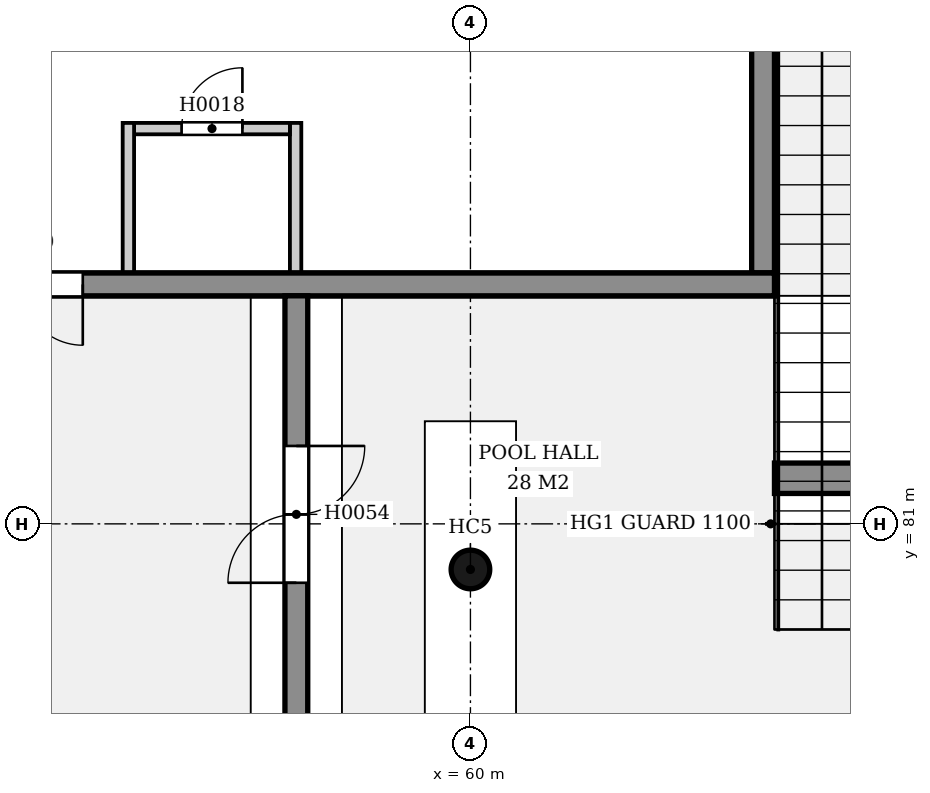
"""IFC4 building model, lengths in metres.
Left out: names, types, materials, properties, quantities, classifications, styles, units other than length and angle.
Written with IfcOpenShell. Run it as: python <this file> out.ifc"""

import sys

from ifc_helpers import new_model, si_unit, direction, frame, frame_2d, origin, origin_2d, place, context, subcontext, project, spatial, rectangle, hollow_circle, extrude, element, fill, save


model = new_model("IFC4")
c1 = context("Model", 3, precision=1e-05, world=origin(), true_north=direction((0.0, 1.0)))
c2 = subcontext(c1, "Body", "Model", "MODEL_VIEW")
j1 = project(units=[si_unit("LENGTHUNIT", "METRE"), si_unit("PLANEANGLEUNIT", "RADIAN")], contexts=[c1])
p1 = place(None, origin())
s1 = spatial("IfcSite", under=j1, at=p1, CompositionType="ELEMENT")
p2 = place(p1, origin())
s2 = spatial("IfcBuilding", under=s1, at=p2, CompositionType="ELEMENT")
p3 = place(p2, origin())
s3 = spatial("IfcBuildingStorey", under=s2, at=p3, CompositionType="ELEMENT", Elevation=0.0)
p4 = place(p3, frame((57.71, 38.0, 0.0), z_axis=(0.0, 0.0, 1.0), x_axis=(0.0, 1.0, 0.0)))
e1 = element("IfcWall", 1, at=p4, inside=s3, PredefinedType="SOLIDWALL", context=c2, shape_type="SweptSolid", body=[
    extrude(rectangle(XDim=46.0, YDim=0.3, at=frame_2d((23.0, 0.0))), origin(), (0.0, 0.0, 1.0), 5.0),
])
p5 = place(p4, frame((1.975, 0.0, 0.0)))
e2 = element("IfcOpeningElement", 2, at=p5, cuts=e1, PredefinedType="OPENING", context=c2, shape_type="SweptSolid", body=[
    extrude(rectangle(XDim=1.8, YDim=2.1, at=frame_2d((0.9, 1.05))), frame((0.0, 0.16, 0.0), z_axis=(0.0, -1.0, 0.0), x_axis=(1.0, 0.0, 0.0)), (0.0, 0.0, 1.0), 0.32),
])
p6 = place(p4, frame((7.725, 0.0, 0.0)))
e3 = element("IfcOpeningElement", 3, at=p6, cuts=e1, PredefinedType="OPENING", context=c2, shape_type="SweptSolid", body=[
    extrude(rectangle(XDim=1.8, YDim=2.1, at=frame_2d((0.9, 1.05))), frame((0.0, 0.16, 0.0), z_axis=(0.0, -1.0, 0.0), x_axis=(1.0, 0.0, 0.0)), (0.0, 0.0, 1.0), 0.32),
])
p7 = place(p4, frame((13.475, 0.0, 0.0)))
e4 = element("IfcOpeningElement", 4, at=p7, cuts=e1, PredefinedType="OPENING", context=c2, shape_type="SweptSolid", body=[
    extrude(rectangle(XDim=1.8, YDim=2.1, at=frame_2d((0.9, 1.05))), frame((0.0, 0.16, 0.0), z_axis=(0.0, -1.0, 0.0), x_axis=(1.0, 0.0, 0.0)), (0.0, 0.0, 1.0), 0.32),
])
p8 = place(p4, frame((19.225, 0.0, 0.0)))
e5 = element("IfcOpeningElement", 5, at=p8, cuts=e1, PredefinedType="OPENING", context=c2, shape_type="SweptSolid", body=[
    extrude(rectangle(XDim=1.8, YDim=2.1, at=frame_2d((0.9, 1.05))), frame((0.0, 0.16, 0.0), z_axis=(0.0, -1.0, 0.0), x_axis=(1.0, 0.0, 0.0)), (0.0, 0.0, 1.0), 0.32),
])
p9 = place(p4, frame((24.975, 0.0, 0.0)))
e6 = element("IfcOpeningElement", 6, at=p9, cuts=e1, PredefinedType="OPENING", context=c2, shape_type="SweptSolid", body=[
    extrude(rectangle(XDim=1.8, YDim=2.1, at=frame_2d((0.9, 1.05))), frame((0.0, 0.16, 0.0), z_axis=(0.0, -1.0, 0.0), x_axis=(1.0, 0.0, 0.0)), (0.0, 0.0, 1.0), 0.32),
])
p10 = place(p4, frame((30.725, 0.0, 0.0)))
e7 = element("IfcOpeningElement", 7, at=p10, cuts=e1, PredefinedType="OPENING", context=c2, shape_type="SweptSolid", body=[
    extrude(rectangle(XDim=1.8, YDim=2.1, at=frame_2d((0.9, 1.05))), frame((0.0, 0.16, 0.0), z_axis=(0.0, -1.0, 0.0), x_axis=(1.0, 0.0, 0.0)), (0.0, 0.0, 1.0), 0.32),
])
p11 = place(p4, frame((36.475, 0.0, 0.0)))
e8 = element("IfcOpeningElement", 8, at=p11, cuts=e1, PredefinedType="OPENING", context=c2, shape_type="SweptSolid", body=[
    extrude(rectangle(XDim=1.8, YDim=2.1, at=frame_2d((0.9, 1.05))), frame((0.0, 0.16, 0.0), z_axis=(0.0, -1.0, 0.0), x_axis=(1.0, 0.0, 0.0)), (0.0, 0.0, 1.0), 0.32),
])
p12 = place(p4, frame((42.225, 0.0, 0.0)))
e9 = element("IfcOpeningElement", 9, at=p12, cuts=e1, PredefinedType="OPENING", context=c2, shape_type="SweptSolid", body=[
    extrude(rectangle(XDim=1.8, YDim=2.1, at=frame_2d((0.9, 1.05))), frame((0.0, 0.16, 0.0), z_axis=(0.0, -1.0, 0.0), x_axis=(1.0, 0.0, 0.0)), (0.0, 0.0, 1.0), 0.32),
])
p13 = place(p3, frame((64.0, 81.6, -0.8), z_axis=(0.0, 0.0, 1.0), x_axis=(1.0, 0.0, 0.0)))
e10 = element("IfcWall", 10, at=p13, inside=s3, PredefinedType="SOLIDWALL", context=c2, shape_type="SweptSolid", body=[
    extrude(rectangle(XDim=76.0, YDim=0.4, at=frame_2d((38.0, 0.0))), origin(), (0.0, 0.0, 1.0), 1.66),
])
p14 = place(p3, frame((63.85, 95.55, -1.6), z_axis=(0.0, 0.0, 1.0), x_axis=(0.0, -1.0, 0.0)))
e11 = element("IfcWall", 11, at=p14, inside=s3, PredefinedType="SOLIDWALL", context=c2, shape_type="SweptSolid", body=[
    extrude(rectangle(XDim=11.25, YDim=0.3, at=frame_2d((5.625, 0.0))), origin(), (0.0, 0.0, 1.0), 1.35),
])
p15 = place(p3, frame((63.85, 95.55, 0.0), z_axis=(0.0, 0.0, 1.0), x_axis=(0.0, -1.0, 0.0)))
e12 = element("IfcWall", 12, at=p15, inside=s3, PredefinedType="SOLIDWALL", context=c2, shape_type="SweptSolid", body=[
    extrude(rectangle(XDim=11.25, YDim=0.3, at=frame_2d((5.625, 0.0))), origin(), (0.0, 0.0, 1.0), 5.0),
])
p16 = place(p15, frame((3.37, 0.0, 0.0)))
e13 = element("IfcOpeningElement", 13, at=p16, cuts=e12, PredefinedType="OPENING", context=c2, shape_type="SweptSolid", body=[
    extrude(rectangle(XDim=1.6, YDim=2.1, at=frame_2d((0.8, 1.05))), frame((0.0, 0.16, 0.0), z_axis=(0.0, -1.0, 0.0), x_axis=(1.0, 0.0, 0.0)), (0.0, 0.0, 1.0), 0.32),
])
p17 = place(p3, frame((52.45, 84.15, -1.6), z_axis=(0.0, 0.0, 1.0), x_axis=(1.0, 0.0, 0.0)))
e14 = element("IfcWall", 14, at=p17, inside=s3, PredefinedType="SOLIDWALL", context=c2, shape_type="SweptSolid", body=[
    extrude(rectangle(XDim=11.55, YDim=0.3, at=frame_2d((5.775, 0.0))), origin(), (0.0, 0.0, 1.0), 1.35),
])
p18 = place(p3, frame((52.45, 84.15, 0.0), z_axis=(0.0, 0.0, 1.0), x_axis=(1.0, 0.0, 0.0)))
e15 = element("IfcWall", 15, at=p18, inside=s3, PredefinedType="SOLIDWALL", context=c2, shape_type="SweptSolid", body=[
    extrude(rectangle(XDim=11.55, YDim=0.3, at=frame_2d((5.775, 0.0))), origin(), (0.0, 0.0, 1.0), 5.0),
])
p19 = place(p18, frame((0.85, 0.0, 0.0)))
e16 = element("IfcOpeningElement", 16, at=p19, cuts=e15, PredefinedType="OPENING", context=c2, shape_type="SweptSolid", body=[
    extrude(rectangle(XDim=1.6, YDim=2.1, at=frame_2d((0.8, 1.05))), frame((0.0, 0.16, 0.0), z_axis=(0.0, -1.0, 0.0), x_axis=(1.0, 0.0, 0.0)), (0.0, 0.0, 1.0), 0.32),
])
p20 = place(p3, frame((60.0, 80.4, 0.0), z_axis=(0.0, 0.0, 1.0), x_axis=(1.0, 0.0, 0.0)))
e17 = element("IfcColumn", 17, at=p20, inside=s3, PredefinedType="COLUMN", context=c2, shape_type="SweptSolid", body=[
    extrude(hollow_circle(Radius=0.254, WallThickness=0.016, at=origin_2d()), origin(), (0.0, 0.0, 1.0), 5.0),
])
p21 = place(p3, frame((55.575, 86.2, 0.0), z_axis=(0.0, 0.0, 1.0), x_axis=(1.0, 0.0, 0.0)))
e18 = element("IfcWall", 18, at=p21, inside=s3, PredefinedType="PARTITIONING", context=c2, shape_type="SweptSolid", body=[
    extrude(rectangle(XDim=2.05, YDim=0.15, at=frame_2d((1.025, 0.0))), origin(), (0.0, 0.0, 1.0), 4.75),
])
p22 = place(p21, frame((0.625, 0.0, 0.0)))
e19 = element("IfcOpeningElement", 19, at=p22, cuts=e18, PredefinedType="OPENING", context=c2, shape_type="SweptSolid", body=[
    extrude(rectangle(XDim=0.8, YDim=2.1, at=frame_2d((0.4, 1.05))), frame((0.0, 0.085, 0.0), z_axis=(0.0, -1.0, 0.0), x_axis=(1.0, 0.0, 0.0)), (0.0, 0.0, 1.0), 0.17),
])
for number, where, z_axis, x_axis in (
    (20, (55.5, 86.275, 0.0), (0.0, 0.0, 1.0), (0.0, -1.0, 0.0)),
    (21, (57.7, 86.275, 0.0), (0.0, 0.0, 1.0), (0.0, -1.0, 0.0)),
):
    element("IfcWall", number, at=place(p3, frame(where, z_axis=z_axis, x_axis=x_axis)), inside=s3, PredefinedType="PARTITIONING", context=c2, shape_type="SweptSolid", body=[
        extrude(rectangle(XDim=1.975, YDim=0.15, at=frame_2d((0.987, 0.0))), origin(), (0.0, 0.0, 1.0), 4.75),
    ])
p23 = place(p22, origin())
e22 = element("IfcDoor", 22, at=p23, inside=s3, OperationType="SINGLE_SWING_RIGHT", PredefinedType="DOOR", context=c2, shape_type="SweptSolid", body=[
    extrude(rectangle(XDim=0.8, YDim=2.1, at=frame_2d((0.4, 1.05))), frame((0.0, 0.025, 0.0), z_axis=(0.0, -1.0, 0.0), x_axis=(1.0, 0.0, 0.0)), (0.0, 0.0, 1.0), 0.05),
])
fill(e19, e22)
p24 = place(p19, origin())
e23 = element("IfcDoor", 23, at=p24, inside=s3, OperationType="DOUBLE_DOOR_SINGLE_SWING", PredefinedType="DOOR", context=c2, shape_type="SweptSolid", body=[
    extrude(rectangle(XDim=1.6, YDim=2.1, at=frame_2d((0.8, 1.05))), frame((0.0, 0.025, 0.0), z_axis=(0.0, -1.0, 0.0), x_axis=(1.0, 0.0, 0.0)), (0.0, 0.0, 1.0), 0.05),
])
fill(e16, e23)
p25 = place(p12, origin())
e24 = element("IfcDoor", 24, at=p25, inside=s3, OperationType="DOUBLE_DOOR_SINGLE_SWING", PredefinedType="DOOR", context=c2, shape_type="SweptSolid", body=[
    extrude(rectangle(XDim=1.8, YDim=2.1, at=frame_2d((0.9, 1.05))), frame((0.0, 0.025, 0.0), z_axis=(0.0, -1.0, 0.0), x_axis=(1.0, 0.0, 0.0)), (0.0, 0.0, 1.0), 0.05),
])
fill(e9, e24)
save(model, sys.argv[1])
